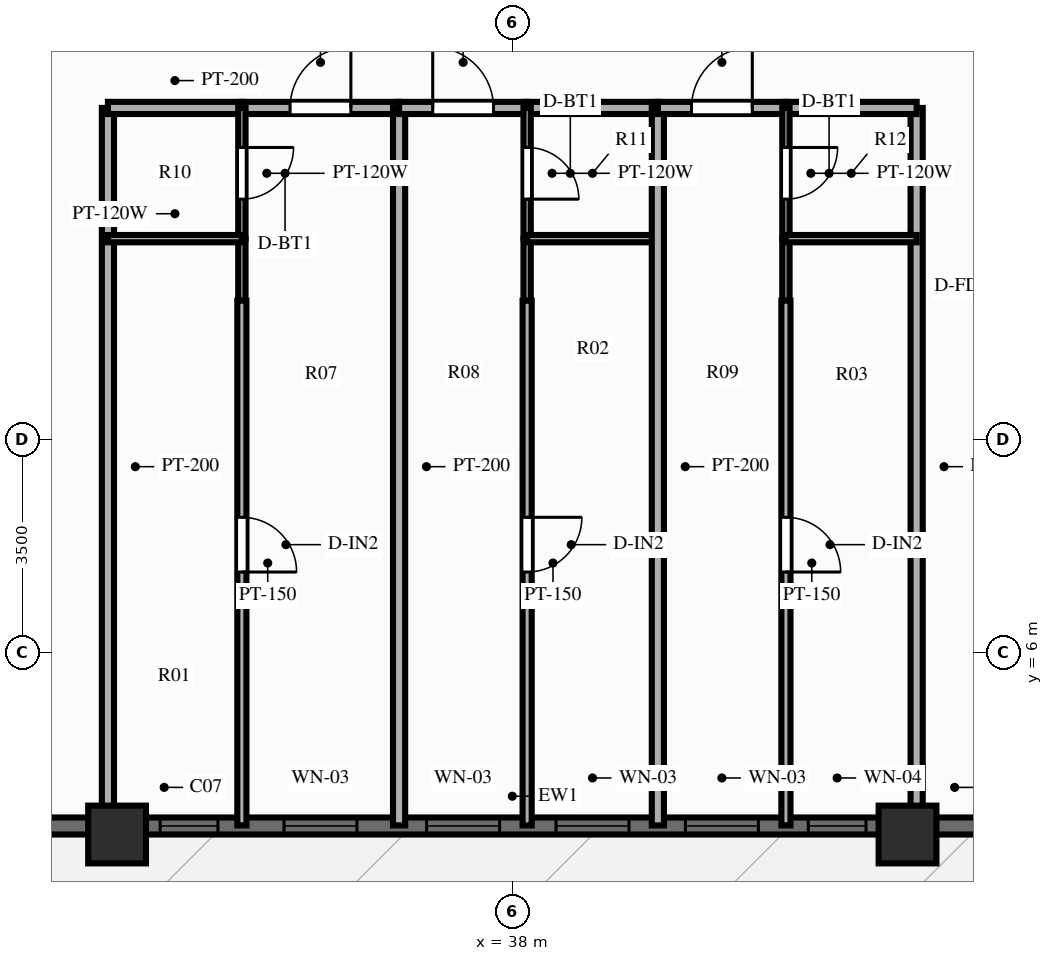
"""IFC4 building model, lengths in metres.
Left out: names, types, materials, properties, quantities, classifications, styles, units other than length and angle.
Written with IfcOpenShell. Run it as: python <this file> out.ifc"""

import sys

from ifc_helpers import new_model, si_unit, direction, frame, frame_2d, origin, origin_2d, place, context, subcontext, project, spatial, rectangle, extrude, source, transform, mapped, element, fill, save


model = new_model("IFC4")
c1 = context("Model", 3, precision=1e-05, world=origin(), true_north=direction((0.0, 1.0)))
c2 = subcontext(c1, "Body", "Model", "MODEL_VIEW")
j1 = project(units=[si_unit("LENGTHUNIT", "METRE"), si_unit("PLANEANGLEUNIT", "RADIAN")], contexts=[c1])
p1 = place(None, origin())
s1 = spatial("IfcSite", under=j1, at=p1, CompositionType="ELEMENT")
p2 = place(p1, origin())
s2 = spatial("IfcBuilding", under=s1, at=p2, CompositionType="ELEMENT")
p3 = place(p2, frame((0.0, 0.0, 104.85)))
s3 = spatial("IfcBuildingStorey", under=s2, at=p3, CompositionType="ELEMENT", Elevation=104.85)
m1 = source(origin(), c2, "Body", "SweptSolid", [
    extrude(rectangle(XDim=0.95, YDim=0.95, at=origin_2d()), origin(), (0.0, 0.0, 1.0), 3.0),
])
for number, where, z_axis, x_axis in (
    (1, (31.5, 3.0, 0.0), (0.0, 0.0, 1.0), (1.0, 0.0, 0.0)),
    (2, (44.5, 3.0, 0.0), (0.0, 0.0, 1.0), (1.0, 0.0, 0.0)),
):
    element("IfcColumn", number, at=place(p3, frame(where, z_axis=z_axis, x_axis=x_axis)), inside=s3, PredefinedType="COLUMN", context=c2, shape_type="MappedRepresentation", body=[
        mapped(m1, transform((0.0, 0.0, 0.0), scale=1.0)),
    ])
p4 = place(p3, frame((16.2, 3.14, 0.0), z_axis=(0.0, 0.0, 1.0), x_axis=(1.0, 0.0, 0.0)))
e3 = element("IfcWall", 3, at=p4, inside=s3, PredefinedType="SOLIDWALL", context=c2, shape_type="SweptSolid", body=[
    extrude(rectangle(XDim=43.6, YDim=0.28, at=frame_2d((21.8, 0.0))), origin(), (0.0, 0.0, 1.0), 2.28),
])
p5 = place(p4, frame((8.2, 0.0, 0.0), z_axis=(0.0, 0.0, 1.0), x_axis=(-1.0, 0.0, 0.0)))
e4 = element("IfcOpeningElement", 4, at=p5, cuts=e3, PredefinedType="OPENING", context=c2, shape_type="SweptSolid", body=[
    extrude(rectangle(XDim=1.1, YDim=2.15, at=frame_2d((0.55, 1.075))), frame((0.0, 0.152, 0.0), z_axis=(0.0, -1.0, 0.0), x_axis=(1.0, 0.0, 0.0)), (0.0, 0.0, 1.0), 0.304),
])
p6 = place(p4, frame((16.009, 0.0, 0.25)))
e5 = element("IfcOpeningElement", 5, at=p6, cuts=e3, PredefinedType="OPENING", context=c2, shape_type="SweptSolid", body=[
    extrude(rectangle(XDim=0.95, YDim=1.5, at=frame_2d((0.475, 0.75))), frame((0.0, 0.152, 0.0), z_axis=(0.0, -1.0, 0.0), x_axis=(1.0, 0.0, 0.0)), (0.0, 0.0, 1.0), 0.304),
])
p7 = place(p4, frame((18.045, 0.0, 0.25)))
e6 = element("IfcOpeningElement", 6, at=p7, cuts=e3, PredefinedType="OPENING", context=c2, shape_type="SweptSolid", body=[
    extrude(rectangle(XDim=1.2, YDim=1.5, at=frame_2d((0.6, 0.75))), frame((0.0, 0.152, 0.0), z_axis=(0.0, -1.0, 0.0), x_axis=(1.0, 0.0, 0.0)), (0.0, 0.0, 1.0), 0.304),
])
p8 = place(p4, frame((20.391, 0.0, 0.25)))
e7 = element("IfcOpeningElement", 7, at=p8, cuts=e3, PredefinedType="OPENING", context=c2, shape_type="SweptSolid", body=[
    extrude(rectangle(XDim=1.2, YDim=1.5, at=frame_2d((0.6, 0.75))), frame((0.0, 0.152, 0.0), z_axis=(0.0, -1.0, 0.0), x_axis=(1.0, 0.0, 0.0)), (0.0, 0.0, 1.0), 0.304),
])
p9 = place(p4, frame((22.519, 0.0, 0.25)))
e8 = element("IfcOpeningElement", 8, at=p9, cuts=e3, PredefinedType="OPENING", context=c2, shape_type="SweptSolid", body=[
    extrude(rectangle(XDim=1.2, YDim=1.5, at=frame_2d((0.6, 0.75))), frame((0.0, 0.152, 0.0), z_axis=(0.0, -1.0, 0.0), x_axis=(1.0, 0.0, 0.0)), (0.0, 0.0, 1.0), 0.304),
])
p10 = place(p4, frame((24.647, 0.0, 0.25)))
e9 = element("IfcOpeningElement", 9, at=p10, cuts=e3, PredefinedType="OPENING", context=c2, shape_type="SweptSolid", body=[
    extrude(rectangle(XDim=1.2, YDim=1.5, at=frame_2d((0.6, 0.75))), frame((0.0, 0.152, 0.0), z_axis=(0.0, -1.0, 0.0), x_axis=(1.0, 0.0, 0.0)), (0.0, 0.0, 1.0), 0.304),
])
p11 = place(p4, frame((26.667, 0.0, 0.25)))
e10 = element("IfcOpeningElement", 10, at=p11, cuts=e3, PredefinedType="OPENING", context=c2, shape_type="SweptSolid", body=[
    extrude(rectangle(XDim=0.95, YDim=1.5, at=frame_2d((0.475, 0.75))), frame((0.0, 0.152, 0.0), z_axis=(0.0, -1.0, 0.0), x_axis=(1.0, 0.0, 0.0)), (0.0, 0.0, 1.0), 0.304),
])
p12 = place(p4, frame((35.35, 0.0, 0.25)))
e11 = element("IfcOpeningElement", 11, at=p12, cuts=e3, PredefinedType="OPENING", context=c2, shape_type="SweptSolid", body=[
    extrude(rectangle(XDim=1.2, YDim=1.5, at=frame_2d((0.6, 0.75))), frame((0.0, 0.152, 0.0), z_axis=(0.0, -1.0, 0.0), x_axis=(1.0, 0.0, 0.0)), (0.0, 0.0, 1.0), 0.304),
])
for number, where, z_axis, x_axis in (
    (12, (31.35, 14.95, 0.0), (0.0, 0.0, 1.0), (0.0, -1.0, 0.0)),
    (13, (44.65, 14.95, 0.0), (0.0, 0.0, 1.0), (0.0, -1.0, 0.0)),
):
    element("IfcWall", number, at=place(p3, frame(where, z_axis=z_axis, x_axis=x_axis)), inside=s3, PredefinedType="PARTITIONING", context=c2, shape_type="SweptSolid", body=[
        extrude(rectangle(XDim=11.8, YDim=0.2, at=frame_2d((5.9, 0.0))), origin(), (0.0, 0.0, 1.0), 2.34),
    ])
p13 = place(p3, frame((31.35, 14.95, 0.0), z_axis=(0.0, 0.0, 1.0), x_axis=(1.0, 0.0, 0.0)))
e14 = element("IfcWall", 14, at=p13, inside=s3, PredefinedType="PARTITIONING", context=c2, shape_type="SweptSolid", body=[
    extrude(rectangle(XDim=2.202, YDim=0.2, at=frame_2d((1.101, 0.0))), origin(), (0.0, 0.0, 1.0), 2.79),
])
p14 = place(p3, frame((33.552, 14.95, 0.0), z_axis=(0.0, 0.0, 1.0), x_axis=(1.0, 0.0, 0.0)))
e15 = element("IfcWall", 15, at=p14, inside=s3, PredefinedType="PARTITIONING", context=c2, shape_type="SweptSolid", body=[
    extrude(rectangle(XDim=2.585, YDim=0.2, at=frame_2d((1.293, 0.0))), origin(), (0.0, 0.0, 1.0), 2.79),
])
p15 = place(p14, frame((0.793, 0.0, 0.0)))
e16 = element("IfcOpeningElement", 16, at=p15, cuts=e15, PredefinedType="OPENING", context=c2, shape_type="SweptSolid", body=[
    extrude(rectangle(XDim=1.0, YDim=2.15, at=frame_2d((0.5, 1.075))), frame((0.0, 0.112, 0.0), z_axis=(0.0, -1.0, 0.0), x_axis=(1.0, 0.0, 0.0)), (0.0, 0.0, 1.0), 0.224),
])
p16 = place(p3, frame((33.552, 14.95, 0.0), z_axis=(0.0, 0.0, 1.0), x_axis=(0.0, -1.0, 0.0)))
e17 = element("IfcWall", 17, at=p16, inside=s3, PredefinedType="PARTITIONING", context=c2, shape_type="SweptSolid", body=[
    extrude(rectangle(XDim=2.15, YDim=0.12, at=frame_2d((1.075, 0.0))), origin(), (0.0, 0.0, 1.0), 2.79),
])
p17 = place(p16, frame((0.65, 0.0, 0.0)))
e18 = element("IfcOpeningElement", 18, at=p17, cuts=e17, PredefinedType="OPENING", context=c2, shape_type="SweptSolid", body=[
    extrude(rectangle(XDim=0.85, YDim=2.05, at=frame_2d((0.425, 1.025))), frame((0.0, 0.072, 0.0), z_axis=(0.0, -1.0, 0.0), x_axis=(1.0, 0.0, 0.0)), (0.0, 0.0, 1.0), 0.144),
])
p18 = place(p3, frame((33.552, 12.8, 0.0), z_axis=(0.0, 0.0, 1.0), x_axis=(0.0, -1.0, 0.0)))
e19 = element("IfcWall", 19, at=p18, inside=s3, PredefinedType="PARTITIONING", context=c2, shape_type="SweptSolid", body=[
    extrude(rectangle(XDim=1.02, YDim=0.12, at=frame_2d((0.51, 0.0))), origin(), (0.0, 0.0, 1.0), 2.79),
])
p19 = place(p3, frame((31.35, 12.8, 0.0), z_axis=(0.0, 0.0, 1.0), x_axis=(1.0, 0.0, 0.0)))
e20 = element("IfcWall", 20, at=p19, inside=s3, PredefinedType="PARTITIONING", context=c2, shape_type="SweptSolid", body=[
    extrude(rectangle(XDim=2.202, YDim=0.12, at=frame_2d((1.101, 0.0))), origin(), (0.0, 0.0, 1.0), 2.79),
])
p20 = place(p3, frame((33.552, 11.78, 0.0), z_axis=(0.0, 0.0, 1.0), x_axis=(0.0, -1.0, 0.0)))
e21 = element("IfcWall", 21, at=p20, inside=s3, PredefinedType="PARTITIONING", context=c2, shape_type="SweptSolid", body=[
    extrude(rectangle(XDim=8.63, YDim=0.15, at=frame_2d((4.315, 0.0))), origin(), (0.0, 0.0, 1.0), 2.79),
])
p21 = place(p20, frame((3.563, 0.0, 0.0)))
e22 = element("IfcOpeningElement", 22, at=p21, cuts=e21, PredefinedType="OPENING", context=c2, shape_type="SweptSolid", body=[
    extrude(rectangle(XDim=0.9, YDim=2.1, at=frame_2d((0.45, 1.05))), frame((0.0, 0.087, 0.0), z_axis=(0.0, -1.0, 0.0), x_axis=(1.0, 0.0, 0.0)), (0.0, 0.0, 1.0), 0.174),
])
p22 = place(p3, frame((36.138, 14.95, 0.0), z_axis=(0.0, 0.0, 1.0), x_axis=(0.0, -1.0, 0.0)))
e23 = element("IfcWall", 23, at=p22, inside=s3, PredefinedType="PARTITIONING", context=c2, shape_type="SweptSolid", body=[
    extrude(rectangle(XDim=11.8, YDim=0.2, at=frame_2d((5.9, 0.0))), origin(), (0.0, 0.0, 1.0), 2.79),
])
p23 = place(p3, frame((36.138, 14.95, 0.0), z_axis=(0.0, 0.0, 1.0), x_axis=(1.0, 0.0, 0.0)))
e24 = element("IfcWall", 24, at=p23, inside=s3, PredefinedType="PARTITIONING", context=c2, shape_type="SweptSolid", body=[
    extrude(rectangle(XDim=2.106, YDim=0.2, at=frame_2d((1.053, 0.0))), origin(), (0.0, 0.0, 1.0), 2.79),
])
p24 = place(p23, frame((0.553, 0.0, 0.0)))
e25 = element("IfcOpeningElement", 25, at=p24, cuts=e24, PredefinedType="OPENING", context=c2, shape_type="SweptSolid", body=[
    extrude(rectangle(XDim=1.0, YDim=2.15, at=frame_2d((0.5, 1.075))), frame((0.0, 0.112, 0.0), z_axis=(0.0, -1.0, 0.0), x_axis=(1.0, 0.0, 0.0)), (0.0, 0.0, 1.0), 0.224),
])
p25 = place(p3, frame((38.244, 14.95, 0.0), z_axis=(0.0, 0.0, 1.0), x_axis=(1.0, 0.0, 0.0)))
e26 = element("IfcWall", 26, at=p25, inside=s3, PredefinedType="PARTITIONING", context=c2, shape_type="SweptSolid", body=[
    extrude(rectangle(XDim=2.15, YDim=0.2, at=frame_2d((1.075, 0.0))), origin(), (0.0, 0.0, 1.0), 2.79),
])
p26 = place(p3, frame((38.244, 14.95, 0.0), z_axis=(0.0, 0.0, 1.0), x_axis=(0.0, -1.0, 0.0)))
e27 = element("IfcWall", 27, at=p26, inside=s3, PredefinedType="PARTITIONING", context=c2, shape_type="SweptSolid", body=[
    extrude(rectangle(XDim=2.15, YDim=0.12, at=frame_2d((1.075, 0.0))), origin(), (0.0, 0.0, 1.0), 2.79),
])
p27 = place(p26, frame((0.65, 0.0, 0.0)))
e28 = element("IfcOpeningElement", 28, at=p27, cuts=e27, PredefinedType="OPENING", context=c2, shape_type="SweptSolid", body=[
    extrude(rectangle(XDim=0.85, YDim=2.05, at=frame_2d((0.425, 1.025))), frame((0.0, 0.072, 0.0), z_axis=(0.0, -1.0, 0.0), x_axis=(1.0, 0.0, 0.0)), (0.0, 0.0, 1.0), 0.144),
])
p28 = place(p3, frame((38.244, 12.8, 0.0), z_axis=(0.0, 0.0, 1.0), x_axis=(0.0, -1.0, 0.0)))
e29 = element("IfcWall", 29, at=p28, inside=s3, PredefinedType="PARTITIONING", context=c2, shape_type="SweptSolid", body=[
    extrude(rectangle(XDim=1.02, YDim=0.12, at=frame_2d((0.51, 0.0))), origin(), (0.0, 0.0, 1.0), 2.79),
])
p29 = place(p3, frame((38.244, 12.8, 0.0), z_axis=(0.0, 0.0, 1.0), x_axis=(1.0, 0.0, 0.0)))
e30 = element("IfcWall", 30, at=p29, inside=s3, PredefinedType="PARTITIONING", context=c2, shape_type="SweptSolid", body=[
    extrude(rectangle(XDim=2.15, YDim=0.12, at=frame_2d((1.075, 0.0))), origin(), (0.0, 0.0, 1.0), 2.79),
])
p30 = place(p3, frame((38.244, 11.78, 0.0), z_axis=(0.0, 0.0, 1.0), x_axis=(0.0, -1.0, 0.0)))
e31 = element("IfcWall", 31, at=p30, inside=s3, PredefinedType="PARTITIONING", context=c2, shape_type="SweptSolid", body=[
    extrude(rectangle(XDim=8.63, YDim=0.15, at=frame_2d((4.315, 0.0))), origin(), (0.0, 0.0, 1.0), 2.79),
])
p31 = place(p30, frame((3.563, 0.0, 0.0)))
e32 = element("IfcOpeningElement", 32, at=p31, cuts=e31, PredefinedType="OPENING", context=c2, shape_type="SweptSolid", body=[
    extrude(rectangle(XDim=0.9, YDim=2.1, at=frame_2d((0.45, 1.05))), frame((0.0, 0.087, 0.0), z_axis=(0.0, -1.0, 0.0), x_axis=(1.0, 0.0, 0.0)), (0.0, 0.0, 1.0), 0.174),
])
p32 = place(p3, frame((40.394, 14.95, 0.0), z_axis=(0.0, 0.0, 1.0), x_axis=(0.0, -1.0, 0.0)))
e33 = element("IfcWall", 33, at=p32, inside=s3, PredefinedType="PARTITIONING", context=c2, shape_type="SweptSolid", body=[
    extrude(rectangle(XDim=11.8, YDim=0.2, at=frame_2d((5.9, 0.0))), origin(), (0.0, 0.0, 1.0), 2.79),
])
p33 = place(p3, frame((40.394, 14.95, 0.0), z_axis=(0.0, 0.0, 1.0), x_axis=(1.0, 0.0, 0.0)))
e34 = element("IfcWall", 34, at=p33, inside=s3, PredefinedType="PARTITIONING", context=c2, shape_type="SweptSolid", body=[
    extrude(rectangle(XDim=2.106, YDim=0.2, at=frame_2d((1.053, 0.0))), origin(), (0.0, 0.0, 1.0), 2.79),
])
p34 = place(p33, frame((0.553, 0.0, 0.0)))
e35 = element("IfcOpeningElement", 35, at=p34, cuts=e34, PredefinedType="OPENING", context=c2, shape_type="SweptSolid", body=[
    extrude(rectangle(XDim=1.0, YDim=2.15, at=frame_2d((0.5, 1.075))), frame((0.0, 0.112, 0.0), z_axis=(0.0, -1.0, 0.0), x_axis=(1.0, 0.0, 0.0)), (0.0, 0.0, 1.0), 0.224),
])
p35 = place(p3, frame((42.5, 14.95, 0.0), z_axis=(0.0, 0.0, 1.0), x_axis=(1.0, 0.0, 0.0)))
e36 = element("IfcWall", 36, at=p35, inside=s3, PredefinedType="PARTITIONING", context=c2, shape_type="SweptSolid", body=[
    extrude(rectangle(XDim=2.15, YDim=0.2, at=frame_2d((1.075, 0.0))), origin(), (0.0, 0.0, 1.0), 2.79),
])
p36 = place(p3, frame((42.5, 14.95, 0.0), z_axis=(0.0, 0.0, 1.0), x_axis=(0.0, -1.0, 0.0)))
e37 = element("IfcWall", 37, at=p36, inside=s3, PredefinedType="PARTITIONING", context=c2, shape_type="SweptSolid", body=[
    extrude(rectangle(XDim=2.15, YDim=0.12, at=frame_2d((1.075, 0.0))), origin(), (0.0, 0.0, 1.0), 2.79),
])
p37 = place(p36, frame((0.65, 0.0, 0.0)))
e38 = element("IfcOpeningElement", 38, at=p37, cuts=e37, PredefinedType="OPENING", context=c2, shape_type="SweptSolid", body=[
    extrude(rectangle(XDim=0.85, YDim=2.05, at=frame_2d((0.425, 1.025))), frame((0.0, 0.072, 0.0), z_axis=(0.0, -1.0, 0.0), x_axis=(1.0, 0.0, 0.0)), (0.0, 0.0, 1.0), 0.144),
])
p38 = place(p3, frame((42.5, 12.8, 0.0), z_axis=(0.0, 0.0, 1.0), x_axis=(0.0, -1.0, 0.0)))
e39 = element("IfcWall", 39, at=p38, inside=s3, PredefinedType="PARTITIONING", context=c2, shape_type="SweptSolid", body=[
    extrude(rectangle(XDim=1.02, YDim=0.12, at=frame_2d((0.51, 0.0))), origin(), (0.0, 0.0, 1.0), 2.79),
])
p39 = place(p3, frame((42.5, 12.8, 0.0), z_axis=(0.0, 0.0, 1.0), x_axis=(1.0, 0.0, 0.0)))
e40 = element("IfcWall", 40, at=p39, inside=s3, PredefinedType="PARTITIONING", context=c2, shape_type="SweptSolid", body=[
    extrude(rectangle(XDim=2.15, YDim=0.12, at=frame_2d((1.075, 0.0))), origin(), (0.0, 0.0, 1.0), 2.79),
])
p40 = place(p3, frame((42.5, 11.78, 0.0), z_axis=(0.0, 0.0, 1.0), x_axis=(0.0, -1.0, 0.0)))
e41 = element("IfcWall", 41, at=p40, inside=s3, PredefinedType="PARTITIONING", context=c2, shape_type="SweptSolid", body=[
    extrude(rectangle(XDim=8.63, YDim=0.15, at=frame_2d((4.315, 0.0))), origin(), (0.0, 0.0, 1.0), 2.79),
])
p41 = place(p40, frame((3.563, 0.0, 0.0)))
e42 = element("IfcOpeningElement", 42, at=p41, cuts=e41, PredefinedType="OPENING", context=c2, shape_type="SweptSolid", body=[
    extrude(rectangle(XDim=0.9, YDim=2.1, at=frame_2d((0.45, 1.05))), frame((0.0, 0.087, 0.0), z_axis=(0.0, -1.0, 0.0), x_axis=(1.0, 0.0, 0.0)), (0.0, 0.0, 1.0), 0.174),
])
m2 = source(origin(), c2, "Body", "SweptSolid", [
    extrude(rectangle(XDim=0.95, YDim=1.5, at=frame_2d((0.475, 0.75))), frame((0.0, 0.03, 0.0), z_axis=(0.0, -1.0, 0.0), x_axis=(1.0, 0.0, 0.0)), (0.0, 0.0, 1.0), 0.06),
])
p42 = place(p6, origin())
e43 = element("IfcWindow", 43, at=p42, inside=s3, PartitioningType="SINGLE_PANEL", PredefinedType="WINDOW", context=c2, shape_type="MappedRepresentation", body=[
    mapped(m2, transform((0.0, 0.0, 0.0), scale=1.0)),
])
fill(e5, e43)
m3 = source(origin(), c2, "Body", "SweptSolid", [
    extrude(rectangle(XDim=1.2, YDim=1.5, at=frame_2d((0.6, 0.75))), frame((0.0, 0.03, 0.0), z_axis=(0.0, -1.0, 0.0), x_axis=(1.0, 0.0, 0.0)), (0.0, 0.0, 1.0), 0.06),
])
p43 = place(p7, origin())
e44 = element("IfcWindow", 44, at=p43, inside=s3, PartitioningType="SINGLE_PANEL", PredefinedType="WINDOW", context=c2, shape_type="MappedRepresentation", body=[
    mapped(m3, transform((0.0, 0.0, 0.0), scale=1.0)),
])
fill(e6, e44)
p44 = place(p8, origin())
e45 = element("IfcWindow", 45, at=p44, inside=s3, PartitioningType="SINGLE_PANEL", PredefinedType="WINDOW", context=c2, shape_type="MappedRepresentation", body=[
    mapped(m3, transform((0.0, 0.0, 0.0), scale=1.0)),
])
fill(e7, e45)
p45 = place(p9, origin())
e46 = element("IfcWindow", 46, at=p45, inside=s3, PartitioningType="SINGLE_PANEL", PredefinedType="WINDOW", context=c2, shape_type="MappedRepresentation", body=[
    mapped(m3, transform((0.0, 0.0, 0.0), scale=1.0)),
])
fill(e8, e46)
p46 = place(p10, origin())
e47 = element("IfcWindow", 47, at=p46, inside=s3, PartitioningType="SINGLE_PANEL", PredefinedType="WINDOW", context=c2, shape_type="MappedRepresentation", body=[
    mapped(m3, transform((0.0, 0.0, 0.0), scale=1.0)),
])
fill(e9, e47)
p47 = place(p11, origin())
e48 = element("IfcWindow", 48, at=p47, inside=s3, PartitioningType="SINGLE_PANEL", PredefinedType="WINDOW", context=c2, shape_type="MappedRepresentation", body=[
    mapped(m2, transform((0.0, 0.0, 0.0), scale=1.0)),
])
fill(e10, e48)
m4 = source(origin(), c2, "Body", "SweptSolid", [
    extrude(rectangle(XDim=1.0, YDim=2.15, at=frame_2d((0.5, 1.075))), frame((0.0, 0.025, 0.0), z_axis=(0.0, -1.0, 0.0), x_axis=(1.0, 0.0, 0.0)), (0.0, 0.0, 1.0), 0.05),
])
p48 = place(p15, origin())
e49 = element("IfcDoor", 49, at=p48, inside=s3, OperationType="SINGLE_SWING_RIGHT", PredefinedType="DOOR", context=c2, shape_type="MappedRepresentation", body=[
    mapped(m4, transform((0.0, 0.0, 0.0), scale=1.0)),
])
fill(e16, e49)
m5 = source(origin(), c2, "Body", "SweptSolid", [
    extrude(rectangle(XDim=0.85, YDim=2.05, at=frame_2d((0.425, 1.025))), frame((0.0, 0.025, 0.0), z_axis=(0.0, -1.0, 0.0), x_axis=(1.0, 0.0, 0.0)), (0.0, 0.0, 1.0), 0.05),
])
p49 = place(p17, origin())
e50 = element("IfcDoor", 50, at=p49, inside=s3, OperationType="SINGLE_SWING_LEFT", PredefinedType="DOOR", context=c2, shape_type="MappedRepresentation", body=[
    mapped(m5, transform((0.0, 0.0, 0.0), scale=1.0)),
])
fill(e18, e50)
m6 = source(origin(), c2, "Body", "SweptSolid", [
    extrude(rectangle(XDim=0.9, YDim=2.1, at=frame_2d((0.45, 1.05))), frame((0.0, 0.025, 0.0), z_axis=(0.0, -1.0, 0.0), x_axis=(1.0, 0.0, 0.0)), (0.0, 0.0, 1.0), 0.05),
])
p50 = place(p21, origin())
e51 = element("IfcDoor", 51, at=p50, inside=s3, OperationType="SINGLE_SWING_RIGHT", PredefinedType="DOOR", context=c2, shape_type="MappedRepresentation", body=[
    mapped(m6, transform((0.0, 0.0, 0.0), scale=1.0)),
])
fill(e22, e51)
p51 = place(p24, origin())
e52 = element("IfcDoor", 52, at=p51, inside=s3, OperationType="SINGLE_SWING_LEFT", PredefinedType="DOOR", context=c2, shape_type="MappedRepresentation", body=[
    mapped(m4, transform((0.0, 0.0, 0.0), scale=1.0)),
])
fill(e25, e52)
p52 = place(p27, origin())
e53 = element("IfcDoor", 53, at=p52, inside=s3, OperationType="SINGLE_SWING_RIGHT", PredefinedType="DOOR", context=c2, shape_type="MappedRepresentation", body=[
    mapped(m5, transform((0.0, 0.0, 0.0), scale=1.0)),
])
fill(e28, e53)
p53 = place(p31, origin())
e54 = element("IfcDoor", 54, at=p53, inside=s3, OperationType="SINGLE_SWING_LEFT", PredefinedType="DOOR", context=c2, shape_type="MappedRepresentation", body=[
    mapped(m6, transform((0.0, 0.0, 0.0), scale=1.0)),
])
fill(e32, e54)
p54 = place(p34, origin())
e55 = element("IfcDoor", 55, at=p54, inside=s3, OperationType="SINGLE_SWING_RIGHT", PredefinedType="DOOR", context=c2, shape_type="MappedRepresentation", body=[
    mapped(m4, transform((0.0, 0.0, 0.0), scale=1.0)),
])
fill(e35, e55)
p55 = place(p37, origin())
e56 = element("IfcDoor", 56, at=p55, inside=s3, OperationType="SINGLE_SWING_LEFT", PredefinedType="DOOR", context=c2, shape_type="MappedRepresentation", body=[
    mapped(m5, transform((0.0, 0.0, 0.0), scale=1.0)),
])
fill(e38, e56)
p56 = place(p41, origin())
e57 = element("IfcDoor", 57, at=p56, inside=s3, OperationType="SINGLE_SWING_RIGHT", PredefinedType="DOOR", context=c2, shape_type="MappedRepresentation", body=[
    mapped(m6, transform((0.0, 0.0, 0.0), scale=1.0)),
])
fill(e42, e57)
save(model, sys.argv[1])
